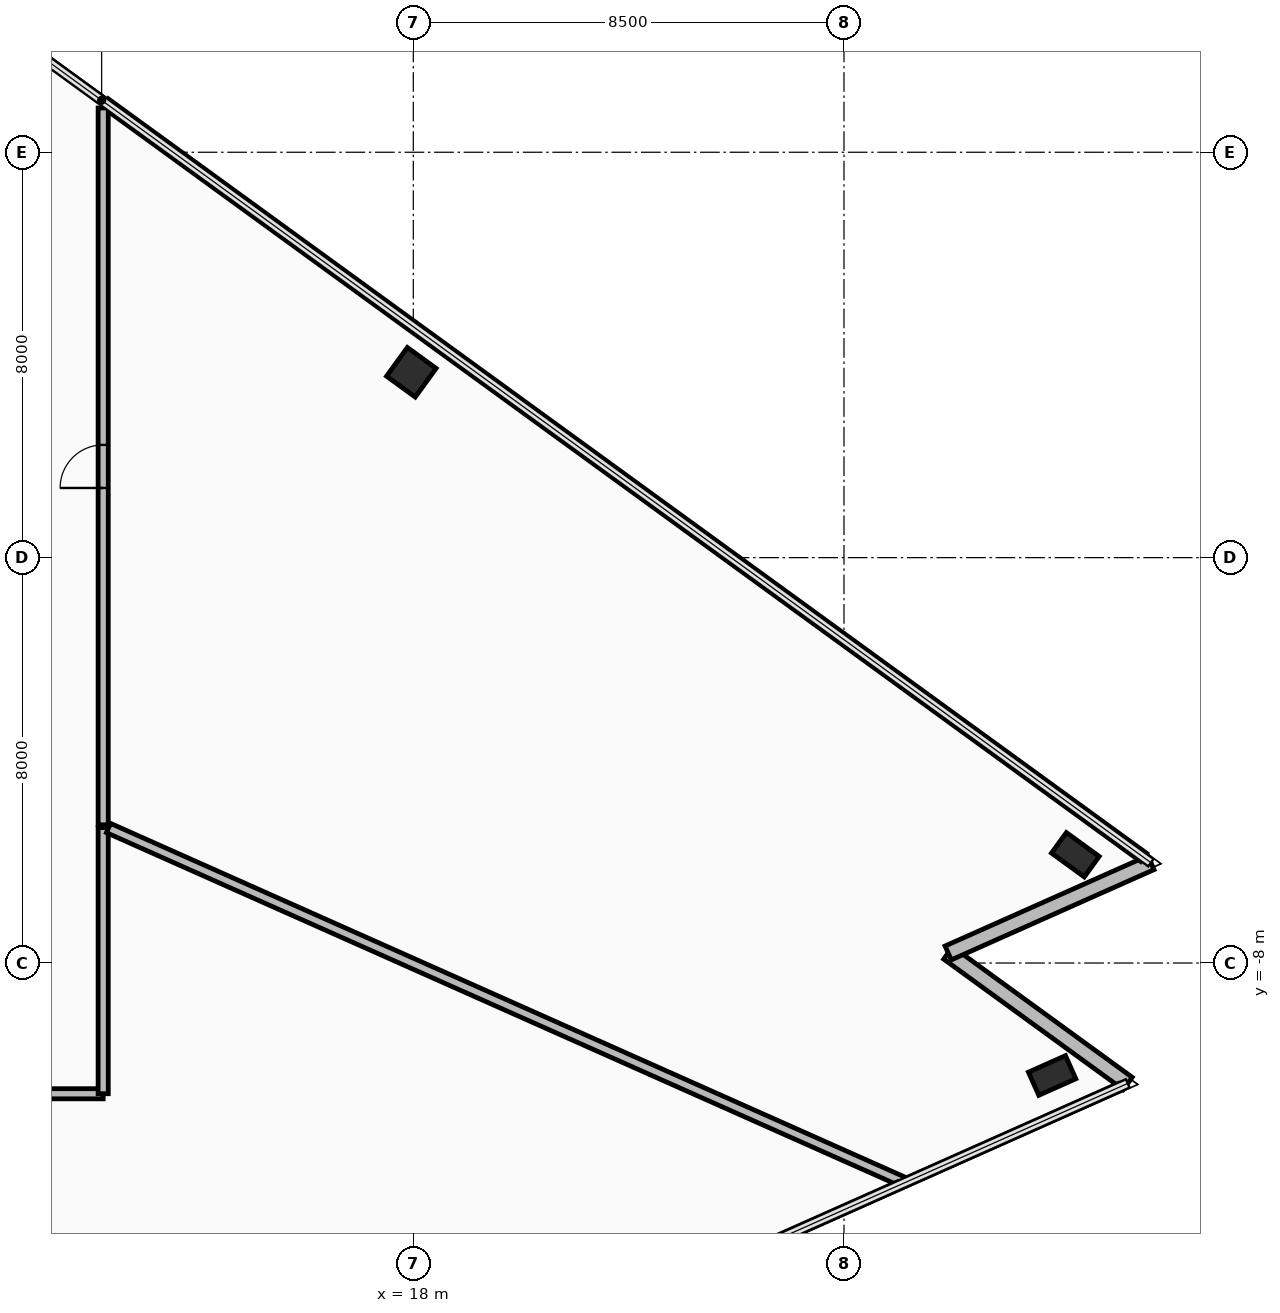
"""IFC4 building model, lengths in metres.
Left out: names, types, materials, properties, quantities, classifications, styles, units other than length and angle.
Written with IfcOpenShell. Run it as: python <this file> out.ifc"""

import sys

from ifc_helpers import new_model, si_unit, direction, frame, frame_2d, origin, origin_2d, place, context, subcontext, project, spatial, rectangle, hollow_rectangle, extrude, element, fill, save


model = new_model("IFC4")
c1 = context("Model", 3, precision=1e-05, world=origin(), true_north=direction((0.0, 1.0)))
c2 = subcontext(c1, "Body", "Model", "MODEL_VIEW")
j1 = project(units=[si_unit("LENGTHUNIT", "METRE"), si_unit("PLANEANGLEUNIT", "RADIAN")], contexts=[c1])
p1 = place(None, origin())
s1 = spatial("IfcSite", under=j1, at=p1, CompositionType="ELEMENT")
p2 = place(p1, origin())
s2 = spatial("IfcBuilding", under=s1, at=p2, CompositionType="ELEMENT")
p3 = place(p2, frame((0.0, 0.0, 130.45)))
s3 = spatial("IfcBuildingStorey", under=s2, at=p3, CompositionType="ELEMENT", Elevation=130.45)
for number, where, z_axis, x_axis in (
    (1, (30.608, -10.219, 0.0), (0.0, 0.0, 1.0), (0.914, 0.407, 0.0)),
    (2, (31.066, -5.863, 0.0), (0.0, 0.0, 1.0), (-0.809, 0.588, 0.0)),
):
    element("IfcColumn", number, at=place(p3, frame(where, z_axis=z_axis, x_axis=x_axis)), inside=s3, PredefinedType="COLUMN", context=c2, shape_type="SweptSolid", body=[
        extrude(hollow_rectangle(XDim=0.5, YDim=0.8, WallThickness=0.04, at=origin_2d()), origin(), (0.0, 0.0, 1.0), 3.6),
    ])
p4 = place(p3, frame((17.961, 3.658, 0.0), z_axis=(0.0, 0.0, 1.0), x_axis=(-0.809016994375, 0.587785252292, 0.0)))
e3 = element("IfcColumn", 3, at=p4, inside=s3, PredefinedType="COLUMN", context=c2, shape_type="SweptSolid", body=[
    extrude(hollow_rectangle(XDim=0.7, YDim=0.7, WallThickness=0.04, at=origin_2d()), origin(), (0.0, 0.0, 1.0), 3.6),
])
for number, where, z_axis, x_axis in (
    (4, (32.1, -10.376, 0.0), (0.0, 0.0, 1.0), (-0.809, 0.588, 0.0)),
    (5, (28.556, -7.802, 0.0), (0.0, 0.0, 1.0), (0.914, 0.407, 0.0)),
):
    element("IfcWall", number, at=place(p3, frame(where, z_axis=z_axis, x_axis=x_axis)), inside=s3, PredefinedType="STANDARD", context=c2, shape_type="SweptSolid", body=[
        extrude(rectangle(XDim=4.38, YDim=0.3, at=frame_2d((2.19, 0.0))), origin(), (0.0, 0.0, 1.0), 2.705),
    ])
p5 = place(p3, frame((-1.09, -10.58, 0.0), z_axis=(0.0, 0.0, 1.0), x_axis=(1.0, 0.0, 0.0)))
e6 = element("IfcWall", 6, at=p5, inside=s3, PredefinedType="PARTITIONING", context=c2, shape_type="SweptSolid", body=[
    extrude(rectangle(XDim=12.969, YDim=0.2, at=frame_2d((6.484, 0.0))), origin(), (0.0, 0.0, 1.0), 2.855),
])
p6 = place(p5, frame((6.059, 0.0, 0.0)))
e7 = element("IfcOpeningElement", 7, at=p6, cuts=e6, PredefinedType="OPENING", context=c2, shape_type="SweptSolid", body=[
    extrude(rectangle(XDim=0.85, YDim=2.1, at=frame_2d((0.425, 1.05))), frame((0.0, 0.11, 0.0), z_axis=(0.0, -1.0, 0.0), x_axis=(1.0, 0.0, 0.0)), (0.0, 0.0, 1.0), 0.22),
])
p7 = place(p3, frame((11.88, -10.579, 0.0), z_axis=(0.0, 0.0, 1.0), x_axis=(0.0, 1.0, 0.0)))
e8 = element("IfcWall", 8, at=p7, inside=s3, PredefinedType="PARTITIONING", context=c2, shape_type="SweptSolid", body=[
    extrude(rectangle(XDim=5.251, YDim=0.2, at=frame_2d((2.626, 0.0))), origin(), (0.0, 0.0, 1.0), 2.855),
])
p8 = place(p3, frame((11.985, -5.336, 0.0), z_axis=(0.0, 0.0, 1.0), x_axis=(0.913548025885, -0.406730874659, 0.0)))
e9 = element("IfcWall", 9, at=p8, inside=s3, PredefinedType="PARTITIONING", context=c2, shape_type="SweptSolid", body=[
    extrude(rectangle(XDim=17.204, YDim=0.2, at=frame_2d((8.602, 0.0))), origin(), (0.0, 0.0, 1.0), 2.705),
])
p9 = place(p3, frame((27.573, -12.391, 0.0), z_axis=(0.0, 0.0, 1.0), x_axis=(-0.913546244788, -0.406734875113, 0.0)))
e10 = element("IfcWall", 10, at=p9, inside=s3, PredefinedType="PARTITIONING", context=c2, shape_type="SweptSolid", body=[
    extrude(rectangle(XDim=33.039, YDim=0.15, at=frame_2d((16.519, 0.0))), origin(), (0.0, 0.0, 1.0), 3.41),
])
p10 = place(p3, frame((11.92, 8.975, 0.0), z_axis=(0.0, 0.0, 1.0), x_axis=(0.809015648515, -0.587787104705, 0.0)))
e11 = element("IfcWall", 11, at=p10, inside=s3, PredefinedType="PARTITIONING", context=c2, shape_type="SweptSolid", body=[
    extrude(rectangle(XDim=25.331, YDim=0.2, at=frame_2d((12.666, 0.0))), origin(), (0.0, 0.0, 1.0), 3.41),
])
p11 = place(p3, frame((31.936, -10.449, 0.0), z_axis=(0.0, 0.0, 1.0), x_axis=(-0.913543524748, -0.406740984401, 0.0)))
e12 = element("IfcWall", 12, at=p11, inside=s3, PredefinedType="PARTITIONING", context=c2, shape_type="SweptSolid", body=[
    extrude(rectangle(XDim=4.624, YDim=0.15, at=frame_2d((2.312, 0.0))), origin(), (0.0, 0.0, 1.0), 3.41),
])
p12 = place(p3, frame((11.88, -5.273, 0.0), z_axis=(0.0, 0.0, 1.0), x_axis=(0.0, 1.0, 0.0)))
e13 = element("IfcWall", 13, at=p12, inside=s3, PredefinedType="PARTITIONING", context=c2, shape_type="SweptSolid", body=[
    extrude(rectangle(XDim=14.147, YDim=0.2, at=frame_2d((7.073, 0.0))), origin(), (0.0, 0.0, 1.0), 2.705),
])
p13 = place(p12, frame((6.648, 0.0, 0.0)))
e14 = element("IfcOpeningElement", 14, at=p13, cuts=e13, PredefinedType="OPENING", context=c2, shape_type="SweptSolid", body=[
    extrude(rectangle(XDim=0.85, YDim=2.1, at=frame_2d((0.425, 1.05))), frame((0.0, 0.11, 0.0), z_axis=(0.0, -1.0, 0.0), x_axis=(1.0, 0.0, 0.0)), (0.0, 0.0, 1.0), 0.22),
])
p14 = place(p13, origin())
e15 = element("IfcDoor", 15, at=p14, inside=s3, OperationType="SINGLE_SWING_RIGHT", PredefinedType="DOOR", context=c2, shape_type="SweptSolid", body=[
    extrude(rectangle(XDim=0.85, YDim=2.1, at=frame_2d((0.425, 1.05))), frame((0.0, 0.025, 0.0), z_axis=(0.0, -1.0, 0.0), x_axis=(1.0, 0.0, 0.0)), (0.0, 0.0, 1.0), 0.05),
])
fill(e14, e15)
save(model, sys.argv[1])
